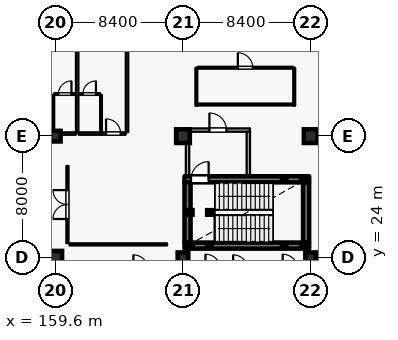
"""IFC4 building model, lengths in metres.
Left out: names, types, materials, properties, quantities, classifications, styles, units other than length and angle.
Written with IfcOpenShell. Run it as: python <this file> out.ifc"""

import sys

from ifc_helpers import new_model, si_unit, direction, frame, frame_2d, origin, origin_2d, place, context, subcontext, project, spatial, rectangle, hollow_rectangle, extrude, element, fill, save


model = new_model("IFC4")
c1 = context("Model", 3, precision=1e-05, world=origin(), true_north=direction((0.0, 1.0)))
c2 = subcontext(c1, "Body", "Model", "MODEL_VIEW")
j1 = project(units=[si_unit("LENGTHUNIT", "METRE"), si_unit("PLANEANGLEUNIT", "RADIAN")], contexts=[c1])
p1 = place(None, origin())
s1 = spatial("IfcSite", under=j1, at=p1, CompositionType="ELEMENT")
p2 = place(p1, origin())
s2 = spatial("IfcBuilding", under=s1, at=p2, CompositionType="ELEMENT")
p3 = place(p2, frame((0.0, 0.0, 16.2)))
s3 = spatial("IfcBuildingStorey", under=s2, at=p3, CompositionType="ELEMENT", Elevation=16.2)
for number, where, z_axis, x_axis in (
    (1, (159.6, 24.0, 0.0), (0.0, 0.0, 1.0), (1.0, 0.0, 0.0)),
    (2, (168.0, 32.0, 0.0), (0.0, 0.0, 1.0), (1.0, 0.0, 0.0)),
    (3, (176.4, 32.0, 0.0), (0.0, 0.0, 1.0), (1.0, 0.0, 0.0)),
):
    element("IfcColumn", number, at=place(p3, frame(where, z_axis=z_axis, x_axis=x_axis)), inside=s3, PredefinedType="COLUMN", context=c2, shape_type="SweptSolid", body=[
        extrude(rectangle(XDim=0.9, YDim=0.9, at=origin_2d()), origin(), (0.0, 0.0, 1.0), 4.8),
    ])
for number, where, z_axis, x_axis in (
    (4, (159.6, 32.0, 0.0), (0.0, 0.0, 1.0), (1.0, 0.0, 0.0)),
    (5, (168.0, 24.0, 0.0), (0.0, 0.0, 1.0), (1.0, 0.0, 0.0)),
    (6, (176.4, 24.0, 0.0), (0.0, 0.0, 1.0), (1.0, 0.0, 0.0)),
):
    element("IfcColumn", number, at=place(p3, frame(where, z_axis=z_axis, x_axis=x_axis)), inside=s3, PredefinedType="COLUMN", context=c2, shape_type="SweptSolid", body=[
        extrude(rectangle(XDim=0.7, YDim=0.7, at=origin_2d()), origin(), (0.0, 0.0, 1.0), 4.8),
    ])
p4 = place(p3, frame((168.1, 24.8, 0.0), z_axis=(0.0, 0.0, 1.0), x_axis=(1.0, 0.0, 0.0)))
e7 = element("IfcWall", 7, at=p4, inside=s3, PredefinedType="SHEAR", context=c2, shape_type="SweptSolid", body=[
    extrude(rectangle(XDim=8.2, YDim=0.4, at=frame_2d((4.1, 0.0))), origin(), (0.0, 0.0, 1.0), 4.535),
])
p5 = place(p3, frame((176.1, 25.005, 0.0), z_axis=(0.0, 0.0, 1.0), x_axis=(0.0, 1.0, 0.0)))
e8 = element("IfcWall", 8, at=p5, inside=s3, PredefinedType="SHEAR", context=c2, shape_type="SweptSolid", body=[
    extrude(rectangle(XDim=3.95, YDim=0.4, at=frame_2d((1.975, 0.0))), origin(), (0.0, 0.0, 1.0), 4.535),
])
p6 = place(p3, frame((168.1, 29.16, 0.0), z_axis=(0.0, 0.0, 1.0), x_axis=(1.0, 0.0, 0.0)))
e9 = element("IfcWall", 9, at=p6, inside=s3, PredefinedType="SHEAR", context=c2, shape_type="SweptSolid", body=[
    extrude(rectangle(XDim=8.2, YDim=0.4, at=frame_2d((4.1, 0.0))), origin(), (0.0, 0.0, 1.0), 4.535),
])
p7 = place(p6, frame((0.43, 0.0, 0.0)))
e10 = element("IfcOpeningElement", 10, at=p7, cuts=e9, PredefinedType="OPENING", context=c2, shape_type="SweptSolid", body=[
    extrude(rectangle(XDim=1.16, YDim=2.2, at=frame_2d((0.58, 1.1))), frame((0.0, 0.21, 0.0), z_axis=(0.0, -1.0, 0.0), x_axis=(1.0, 0.0, 0.0)), (0.0, 0.0, 1.0), 0.42),
])
p8 = place(p3, frame((168.3, 25.005, 0.0), z_axis=(0.0, 0.0, 1.0), x_axis=(0.0, 1.0, 0.0)))
e11 = element("IfcWall", 11, at=p8, inside=s3, PredefinedType="SHEAR", context=c2, shape_type="SweptSolid", body=[
    extrude(rectangle(XDim=3.95, YDim=0.4, at=frame_2d((1.975, 0.0))), origin(), (0.0, 0.0, 1.0), 4.535),
])
p9 = place(p3, frame((168.3, 29.365, 0.0), z_axis=(0.0, 0.0, 1.0), x_axis=(0.0, 1.0, 0.0)))
e12 = element("IfcWall", 12, at=p9, inside=s3, PredefinedType="PARTITIONING", context=c2, shape_type="SweptSolid", body=[
    extrude(rectangle(XDim=2.92, YDim=0.22, at=frame_2d((1.46, 0.0))), origin(), (0.0, 0.0, 1.0), 4.535),
])
p10 = place(p3, frame((168.19, 32.4, 0.0), z_axis=(0.0, 0.0, 1.0), x_axis=(1.0, 0.0, 0.0)))
e13 = element("IfcWall", 13, at=p10, inside=s3, PredefinedType="PARTITIONING", context=c2, shape_type="SweptSolid", body=[
    extrude(rectangle(XDim=4.22, YDim=0.22, at=frame_2d((2.11, 0.0))), origin(), (0.0, 0.0, 1.0), 4.535),
])
p11 = place(p10, frame((1.55, 0.0, 0.0)))
e14 = element("IfcOpeningElement", 14, at=p11, cuts=e13, PredefinedType="OPENING", context=c2, shape_type="SweptSolid", body=[
    extrude(rectangle(XDim=1.12, YDim=2.2, at=frame_2d((0.56, 1.1))), frame((0.0, 0.12, 0.0), z_axis=(0.0, -1.0, 0.0), x_axis=(1.0, 0.0, 0.0)), (0.0, 0.0, 1.0), 0.24),
])
p12 = place(p3, frame((172.3, 29.365, 0.0), z_axis=(0.0, 0.0, 1.0), x_axis=(0.0, 1.0, 0.0)))
e15 = element("IfcWall", 15, at=p12, inside=s3, PredefinedType="PARTITIONING", context=c2, shape_type="SweptSolid", body=[
    extrude(rectangle(XDim=2.92, YDim=0.22, at=frame_2d((1.46, 0.0))), origin(), (0.0, 0.0, 1.0), 4.535),
])
for number, where, z_axis, x_axis in (
    (16, (168.48, 24.8, 0.0), (0.0, 0.0, 1.0), (1.0, 0.0, 0.0)),
    (17, (168.48, 26.98, 0.0), (0.0, 0.0, 1.0), (1.0, 0.0, 0.0)),
    (18, (169.74, 24.8, 0.0), (0.0, 0.0, 1.0), (1.0, 0.0, 0.0)),
    (19, (169.74, 26.98, 0.0), (0.0, 0.0, 1.0), (1.0, 0.0, 0.0)),
):
    element("IfcColumn", number, at=place(p3, frame(where, z_axis=z_axis, x_axis=x_axis)), inside=s3, PredefinedType="COLUMN", context=c2, shape_type="SweptSolid", body=[
        extrude(hollow_rectangle(XDim=0.3, YDim=0.3, WallThickness=0.012, at=origin_2d()), origin(), (0.0, 0.0, 1.0), 4.62),
    ])
for number, where, z_axis, x_axis in (
    (20, (174.66, 24.8, -2.4), (0.0, 0.0, 1.0), (1.0, 0.0, 0.0)),
    (21, (174.66, 29.16, -2.4), (0.0, 0.0, 1.0), (1.0, 0.0, 0.0)),
    (22, (175.92, 24.8, -2.4), (0.0, 0.0, 1.0), (1.0, 0.0, 0.0)),
    (23, (175.92, 29.16, -2.4), (0.0, 0.0, 1.0), (1.0, 0.0, 0.0)),
):
    element("IfcColumn", number, at=place(p3, frame(where, z_axis=z_axis, x_axis=x_axis)), inside=s3, PredefinedType="COLUMN", context=c2, shape_type="SweptSolid", body=[
        extrude(hollow_rectangle(XDim=0.3, YDim=0.3, WallThickness=0.012, at=origin_2d()), origin(), (0.0, 0.0, 1.0), 4.62),
    ])
p13 = place(p3, frame((157.85, 32.17, 0.0), z_axis=(0.0, 0.0, 1.0), x_axis=(1.0, 0.0, 0.0)))
e24 = element("IfcWall", 24, at=p13, inside=s3, PredefinedType="PARTITIONING", context=c2, shape_type="SweptSolid", body=[
    extrude(rectangle(XDim=1.62, YDim=0.16, at=frame_2d((0.81, 0.0))), origin(), (0.0, 0.0, 1.0), 4.535),
])
p14 = place(p13, frame((0.308, 0.0, 0.0)))
e25 = element("IfcOpeningElement", 25, at=p14, cuts=e24, PredefinedType="OPENING", context=c2, shape_type="SweptSolid", body=[
    extrude(rectangle(XDim=0.96, YDim=2.2, at=frame_2d((0.48, 1.1))), frame((0.0, 0.09, 0.0), z_axis=(0.0, -1.0, 0.0), x_axis=(1.0, 0.0, 0.0)), (0.0, 0.0, 1.0), 0.18),
])
p15 = place(p3, frame((159.48, 32.17, 0.0), z_axis=(0.0, 0.0, 1.0), x_axis=(1.0, 0.0, 0.0)))
e26 = element("IfcWall", 26, at=p15, inside=s3, PredefinedType="PARTITIONING", context=c2, shape_type="SweptSolid", body=[
    extrude(rectangle(XDim=1.47, YDim=0.16, at=frame_2d((0.735, 0.0))), origin(), (0.0, 0.0, 1.0), 4.535),
])
p16 = place(p3, frame((159.47, 32.26, 0.0), z_axis=(0.0, 0.0, 1.0), x_axis=(0.0, 1.0, 0.0)))
e27 = element("IfcWall", 27, at=p16, inside=s3, PredefinedType="PARTITIONING", context=c2, shape_type="SweptSolid", body=[
    extrude(rectangle(XDim=2.45, YDim=0.115, at=frame_2d((1.225, 0.0))), origin(), (0.0, 0.0, 1.0), 4.535),
])
p17 = place(p3, frame((159.53, 34.77, 0.0), z_axis=(0.0, 0.0, 1.0), x_axis=(1.0, 0.0, 0.0)))
e28 = element("IfcWall", 28, at=p17, inside=s3, PredefinedType="PARTITIONING", context=c2, shape_type="SweptSolid", body=[
    extrude(rectangle(XDim=1.41, YDim=0.115, at=frame_2d((0.705, 0.0))), origin(), (0.0, 0.0, 1.0), 4.535),
])
p18 = place(p17, frame((0.275, 0.0, 0.0)))
e29 = element("IfcOpeningElement", 29, at=p18, cuts=e28, PredefinedType="OPENING", context=c2, shape_type="SweptSolid", body=[
    extrude(rectangle(XDim=0.86, YDim=2.12, at=frame_2d((0.43, 1.06))), frame((0.0, 0.067, 0.0), z_axis=(0.0, -1.0, 0.0), x_axis=(1.0, 0.0, 0.0)), (0.0, 0.0, 1.0), 0.135),
])
p19 = place(p3, frame((161.13, 32.17, 0.0), z_axis=(0.0, 0.0, 1.0), x_axis=(1.0, 0.0, 0.0)))
e30 = element("IfcWall", 30, at=p19, inside=s3, PredefinedType="PARTITIONING", context=c2, shape_type="SweptSolid", body=[
    extrude(rectangle(XDim=1.47, YDim=0.16, at=frame_2d((0.735, 0.0))), origin(), (0.0, 0.0, 1.0), 4.535),
])
p20 = place(p3, frame((162.61, 32.17, 0.0), z_axis=(0.0, 0.0, 1.0), x_axis=(1.0, 0.0, 0.0)))
e31 = element("IfcWall", 31, at=p20, inside=s3, PredefinedType="PARTITIONING", context=c2, shape_type="SweptSolid", body=[
    extrude(rectangle(XDim=1.62, YDim=0.16, at=frame_2d((0.81, 0.0))), origin(), (0.0, 0.0, 1.0), 4.535),
])
p21 = place(p20, frame((0.33, 0.0, 0.0)))
e32 = element("IfcOpeningElement", 32, at=p21, cuts=e31, PredefinedType="OPENING", context=c2, shape_type="SweptSolid", body=[
    extrude(rectangle(XDim=0.96, YDim=2.2, at=frame_2d((0.48, 1.1))), frame((0.0, 0.09, 0.0), z_axis=(0.0, -1.0, 0.0), x_axis=(1.0, 0.0, 0.0)), (0.0, 0.0, 1.0), 0.18),
])
p22 = place(p3, frame((162.61, 32.26, 0.0), z_axis=(0.0, 0.0, 1.0), x_axis=(0.0, 1.0, 0.0)))
e33 = element("IfcWall", 33, at=p22, inside=s3, PredefinedType="PARTITIONING", context=c2, shape_type="SweptSolid", body=[
    extrude(rectangle(XDim=2.45, YDim=0.115, at=frame_2d((1.225, 0.0))), origin(), (0.0, 0.0, 1.0), 4.535),
])
p23 = place(p3, frame((161.14, 34.77, 0.0), z_axis=(0.0, 0.0, 1.0), x_axis=(1.0, 0.0, 0.0)))
e34 = element("IfcWall", 34, at=p23, inside=s3, PredefinedType="PARTITIONING", context=c2, shape_type="SweptSolid", body=[
    extrude(rectangle(XDim=1.41, YDim=0.115, at=frame_2d((0.705, 0.0))), origin(), (0.0, 0.0, 1.0), 4.535),
])
p24 = place(p23, frame((0.275, 0.0, 0.0)))
e35 = element("IfcOpeningElement", 35, at=p24, cuts=e34, PredefinedType="OPENING", context=c2, shape_type="SweptSolid", body=[
    extrude(rectangle(XDim=0.86, YDim=2.12, at=frame_2d((0.43, 1.06))), frame((0.0, 0.067, 0.0), z_axis=(0.0, -1.0, 0.0), x_axis=(1.0, 0.0, 0.0)), (0.0, 0.0, 1.0), 0.135),
])
p25 = place(p3, frame((161.04, 32.26, 0.0), z_axis=(0.0, 0.0, 1.0), x_axis=(0.0, 1.0, 0.0)))
e36 = element("IfcWall", 36, at=p25, inside=s3, PredefinedType="PARTITIONING", context=c2, shape_type="SweptSolid", body=[
    extrude(rectangle(XDim=8.77, YDim=0.16, at=frame_2d((4.385, 0.0))), origin(), (0.0, 0.0, 1.0), 4.535),
])
p26 = place(p3, frame((164.32, 32.26, 0.0), z_axis=(0.0, 0.0, 1.0), x_axis=(0.0, 1.0, 0.0)))
e37 = element("IfcWall", 37, at=p26, inside=s3, PredefinedType="PARTITIONING", context=c2, shape_type="SweptSolid", body=[
    extrude(rectangle(XDim=8.64, YDim=0.16, at=frame_2d((4.32, 0.0))), origin(), (0.0, 0.0, 1.0), 4.535),
])
p27 = place(p3, frame((160.4, 24.96, 0.0), z_axis=(0.0, 0.0, 1.0), x_axis=(0.0, 1.0, 0.0)))
e38 = element("IfcWall", 38, at=p27, inside=s3, PredefinedType="PARTITIONING", context=c2, shape_type="SweptSolid", body=[
    extrude(rectangle(XDim=5.08, YDim=0.14, at=frame_2d((2.54, 0.0))), origin(), (0.0, 0.0, 1.0), 4.535),
])
p28 = place(p27, frame((1.59, 0.0, 0.0)))
e39 = element("IfcOpeningElement", 39, at=p28, cuts=e38, PredefinedType="OPENING", context=c2, shape_type="SweptSolid", body=[
    extrude(rectangle(XDim=1.9, YDim=2.4, at=frame_2d((0.95, 1.2))), frame((0.0, 0.08, 0.0), z_axis=(0.0, -1.0, 0.0), x_axis=(1.0, 0.0, 0.0)), (0.0, 0.0, 1.0), 0.16),
])
p29 = place(p3, frame((160.54, 24.88, 0.0), z_axis=(0.0, 0.0, 1.0), x_axis=(1.0, 0.0, 0.0)))
e40 = element("IfcWall", 40, at=p29, inside=s3, PredefinedType="PARTITIONING", context=c2, shape_type="SweptSolid", body=[
    extrude(rectangle(XDim=6.41, YDim=0.14, at=frame_2d((3.205, 0.0))), origin(), (0.0, 0.0, 1.0), 4.535),
])
p30 = place(p3, frame((168.96, 36.5, 0.0), z_axis=(0.0, 0.0, 1.0), x_axis=(1.0, 0.0, 0.0)))
e41 = element("IfcWall", 41, at=p30, inside=s3, PredefinedType="PARTITIONING", context=c2, shape_type="SweptSolid", body=[
    extrude(rectangle(XDim=6.28, YDim=0.125, at=frame_2d((3.14, 0.0))), origin(), (0.0, 0.0, 1.0), 4.535),
])
p31 = place(p30, frame((2.65, 0.0, 0.0)))
e42 = element("IfcOpeningElement", 42, at=p31, cuts=e41, PredefinedType="OPENING", context=c2, shape_type="SweptSolid", body=[
    extrude(rectangle(XDim=0.98, YDim=2.15, at=frame_2d((0.49, 1.075))), frame((0.0, 0.073, 0.0), z_axis=(0.0, -1.0, 0.0), x_axis=(1.0, 0.0, 0.0)), (0.0, 0.0, 1.0), 0.145),
])
for number, where, z_axis, x_axis in (
    (43, (168.88, 34.0, 0.0), (0.0, 0.0, 1.0), (0.0, 1.0, 0.0)),
    (44, (175.32, 34.0, 0.0), (0.0, 0.0, 1.0), (0.0, 1.0, 0.0)),
):
    element("IfcWall", number, at=place(p3, frame(where, z_axis=z_axis, x_axis=x_axis)), inside=s3, PredefinedType="PARTITIONING", context=c2, shape_type="SweptSolid", body=[
        extrude(rectangle(XDim=2.496, YDim=0.125, at=frame_2d((1.248, 0.0))), origin(), (0.0, 0.0, 1.0), 4.535),
    ])
p32 = place(p3, frame((168.943, 34.08, 0.0), z_axis=(0.0, 0.0, 1.0), x_axis=(1.0, 0.0, 0.0)))
e45 = element("IfcWall", 45, at=p32, inside=s3, PredefinedType="PARTITIONING", context=c2, shape_type="SweptSolid", body=[
    extrude(rectangle(XDim=6.314, YDim=0.125, at=frame_2d((3.157, 0.0))), origin(), (0.0, 0.0, 1.0), 4.535),
])
p33 = place(p7, origin())
e46 = element("IfcDoor", 46, at=p33, inside=s3, OperationType="SINGLE_SWING_RIGHT", PredefinedType="DOOR", context=c2, shape_type="SweptSolid", body=[
    extrude(rectangle(XDim=1.16, YDim=2.2, at=frame_2d((0.58, 1.1))), frame((0.0, 0.025, 0.0), z_axis=(0.0, -1.0, 0.0), x_axis=(1.0, 0.0, 0.0)), (0.0, 0.0, 1.0), 0.05),
])
fill(e10, e46)
p34 = place(p11, origin())
e47 = element("IfcDoor", 47, at=p34, inside=s3, OperationType="SINGLE_SWING_LEFT", PredefinedType="DOOR", context=c2, shape_type="SweptSolid", body=[
    extrude(rectangle(XDim=1.12, YDim=2.2, at=frame_2d((0.56, 1.1))), frame((0.0, 0.025, 0.0), z_axis=(0.0, -1.0, 0.0), x_axis=(1.0, 0.0, 0.0)), (0.0, 0.0, 1.0), 0.05),
])
fill(e14, e47)
p35 = place(p18, origin())
e48 = element("IfcDoor", 48, at=p35, inside=s3, OperationType="SINGLE_SWING_RIGHT", PredefinedType="DOOR", context=c2, shape_type="SweptSolid", body=[
    extrude(rectangle(XDim=0.86, YDim=2.12, at=frame_2d((0.43, 1.06))), frame((0.0, 0.025, 0.0), z_axis=(0.0, -1.0, 0.0), x_axis=(1.0, 0.0, 0.0)), (0.0, 0.0, 1.0), 0.05),
])
fill(e29, e48)
p36 = place(p21, origin())
e49 = element("IfcDoor", 49, at=p36, inside=s3, OperationType="SINGLE_SWING_LEFT", PredefinedType="DOOR", context=c2, shape_type="SweptSolid", body=[
    extrude(rectangle(XDim=0.96, YDim=2.2, at=frame_2d((0.48, 1.1))), frame((0.0, 0.025, 0.0), z_axis=(0.0, -1.0, 0.0), x_axis=(1.0, 0.0, 0.0)), (0.0, 0.0, 1.0), 0.05),
])
fill(e32, e49)
p37 = place(p24, origin())
e50 = element("IfcDoor", 50, at=p37, inside=s3, OperationType="SINGLE_SWING_RIGHT", PredefinedType="DOOR", context=c2, shape_type="SweptSolid", body=[
    extrude(rectangle(XDim=0.86, YDim=2.12, at=frame_2d((0.43, 1.06))), frame((0.0, 0.025, 0.0), z_axis=(0.0, -1.0, 0.0), x_axis=(1.0, 0.0, 0.0)), (0.0, 0.0, 1.0), 0.05),
])
fill(e35, e50)
p38 = place(p28, origin())
e51 = element("IfcDoor", 51, at=p38, inside=s3, OperationType="DOUBLE_DOOR_SINGLE_SWING", PredefinedType="DOOR", context=c2, shape_type="SweptSolid", body=[
    extrude(rectangle(XDim=1.9, YDim=2.4, at=frame_2d((0.95, 1.2))), frame((0.0, 0.025, 0.0), z_axis=(0.0, -1.0, 0.0), x_axis=(1.0, 0.0, 0.0)), (0.0, 0.0, 1.0), 0.05),
])
fill(e39, e51)
p39 = place(p31, origin())
e52 = element("IfcDoor", 52, at=p39, inside=s3, OperationType="SINGLE_SWING_LEFT", PredefinedType="DOOR", context=c2, shape_type="SweptSolid", body=[
    extrude(rectangle(XDim=0.98, YDim=2.15, at=frame_2d((0.49, 1.075))), frame((0.0, 0.025, 0.0), z_axis=(0.0, -1.0, 0.0), x_axis=(1.0, 0.0, 0.0)), (0.0, 0.0, 1.0), 0.05),
])
fill(e42, e52)
save(model, sys.argv[1])
